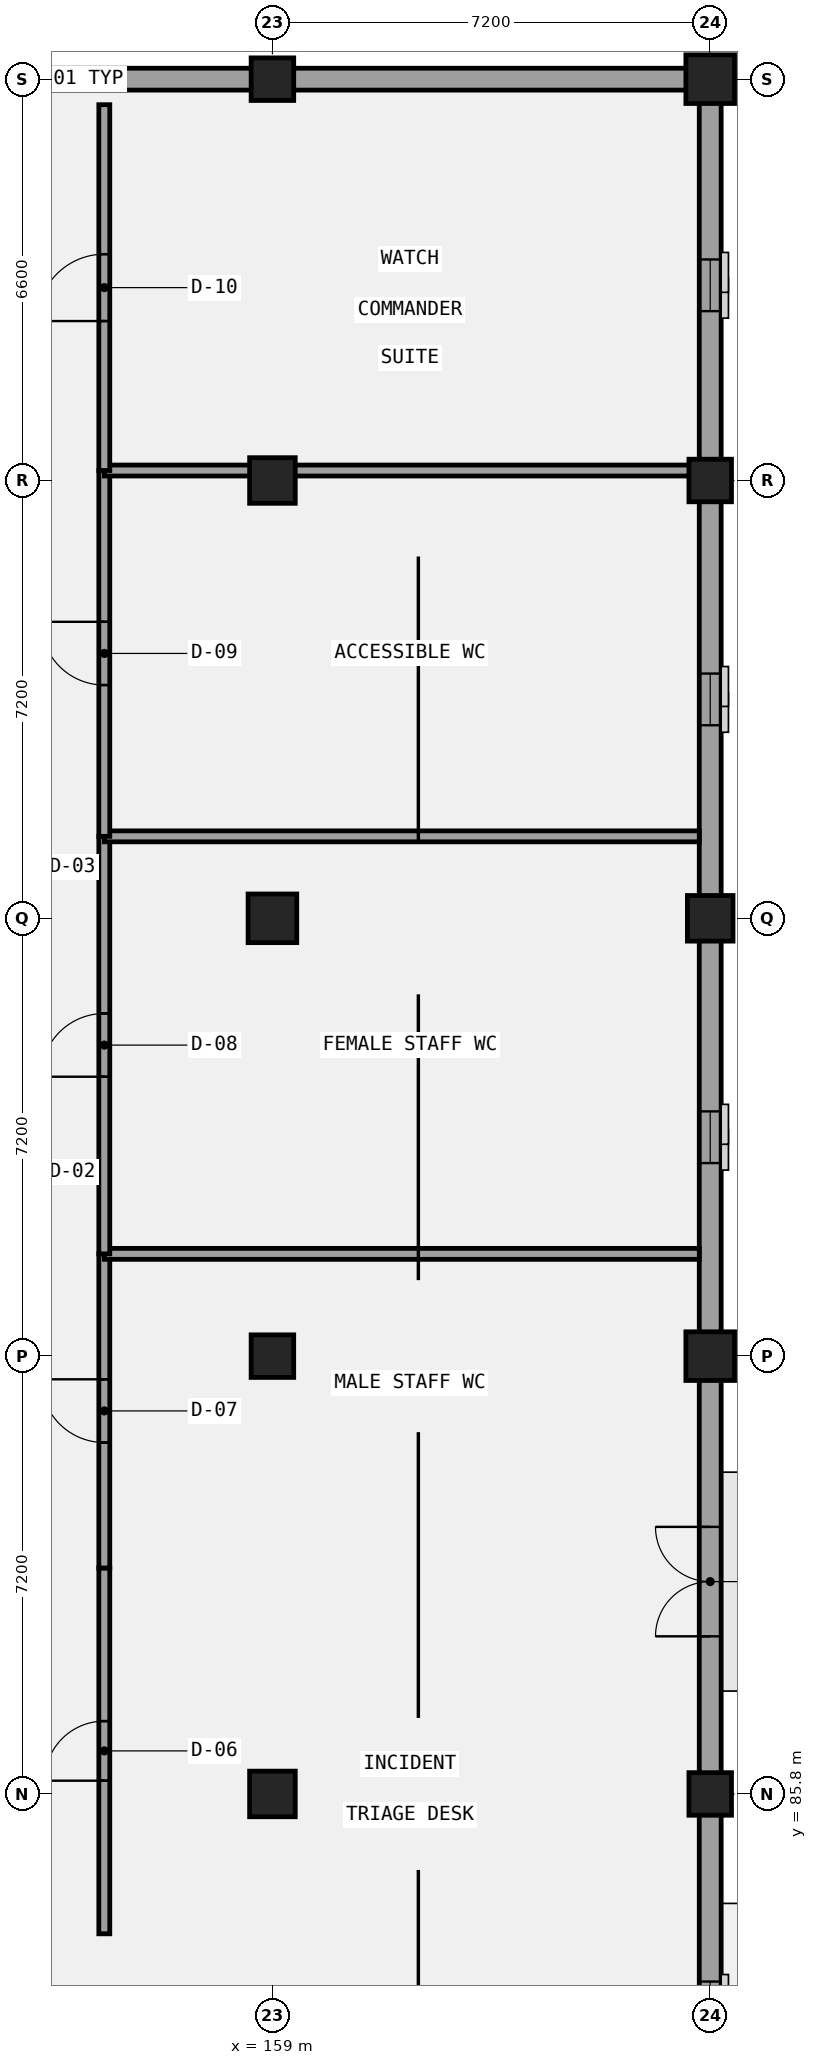
"""IFC4 building model, lengths in metres.
Left out: names, types, materials, properties, quantities, classifications, styles, units other than length and angle.
Written with IfcOpenShell. Run it as: python <this file> out.ifc"""

import sys

from ifc_helpers import new_model, si_unit, direction, frame, frame_2d, origin, origin_2d, place, context, subcontext, project, spatial, rectangle, extrude, element, fill, save


model = new_model("IFC4")
c1 = context("Model", 3, precision=1e-05, world=origin(), true_north=direction((0.0, 1.0)))
c2 = subcontext(c1, "Body", "Model", "MODEL_VIEW")
j1 = project(units=[si_unit("LENGTHUNIT", "METRE"), si_unit("PLANEANGLEUNIT", "RADIAN")], contexts=[c1])
p1 = place(None, origin())
s1 = spatial("IfcSite", under=j1, at=p1, CompositionType="ELEMENT")
p2 = place(p1, origin())
s2 = spatial("IfcBuilding", under=s1, at=p2, CompositionType="ELEMENT")
p3 = place(p2, origin())
s3 = spatial("IfcBuildingStorey", under=s2, at=p3, CompositionType="ELEMENT", Elevation=0.0)
p4 = place(p3, frame((159.0, 85.8, 0.0), z_axis=(0.0, 0.0, 1.0), x_axis=(1.0, 0.0, 0.0)))
e1 = element("IfcColumn", 1, at=p4, inside=s3, PredefinedType="COLUMN", context=c2, shape_type="SweptSolid", body=[
    extrude(rectangle(XDim=0.75, YDim=0.75, at=origin_2d()), origin(), (0.0, 0.0, 1.0), 5.4),
])
p5 = place(p3, frame((159.0, 93.0, 0.0), z_axis=(0.0, 0.0, 1.0), x_axis=(1.0, 0.0, 0.0)))
e2 = element("IfcColumn", 2, at=p5, inside=s3, PredefinedType="COLUMN", context=c2, shape_type="SweptSolid", body=[
    extrude(rectangle(XDim=0.7, YDim=0.7, at=origin_2d()), origin(), (0.0, 0.0, 1.0), 5.4),
])
p6 = place(p3, frame((159.0, 100.2, 0.0), z_axis=(0.0, 0.0, 1.0), x_axis=(1.0, 0.0, 0.0)))
e3 = element("IfcColumn", 3, at=p6, inside=s3, PredefinedType="COLUMN", context=c2, shape_type="SweptSolid", body=[
    extrude(rectangle(XDim=0.8, YDim=0.8, at=origin_2d()), origin(), (0.0, 0.0, 1.0), 5.4),
])
p7 = place(p3, frame((159.0, 107.4, 0.0), z_axis=(0.0, 0.0, 1.0), x_axis=(1.0, 0.0, 0.0)))
e4 = element("IfcColumn", 4, at=p7, inside=s3, PredefinedType="COLUMN", context=c2, shape_type="SweptSolid", body=[
    extrude(rectangle(XDim=0.75, YDim=0.75, at=origin_2d()), origin(), (0.0, 0.0, 1.0), 5.4),
])
for number, where, z_axis, x_axis in (
    (5, (159.0, 114.0, 0.0), (0.0, 0.0, 1.0), (1.0, 0.0, 0.0)),
    (6, (166.2, 85.8, 0.0), (0.0, 0.0, 1.0), (1.0, 0.0, 0.0)),
):
    element("IfcColumn", number, at=place(p3, frame(where, z_axis=z_axis, x_axis=x_axis)), inside=s3, PredefinedType="COLUMN", context=c2, shape_type="SweptSolid", body=[
        extrude(rectangle(XDim=0.7, YDim=0.7, at=origin_2d()), origin(), (0.0, 0.0, 1.0), 5.4),
    ])
p8 = place(p3, frame((166.2, 93.0, 0.0), z_axis=(0.0, 0.0, 1.0), x_axis=(1.0, 0.0, 0.0)))
e7 = element("IfcColumn", 7, at=p8, inside=s3, PredefinedType="COLUMN", context=c2, shape_type="SweptSolid", body=[
    extrude(rectangle(XDim=0.8, YDim=0.8, at=origin_2d()), origin(), (0.0, 0.0, 1.0), 5.4),
])
p9 = place(p3, frame((166.2, 100.2, 0.0), z_axis=(0.0, 0.0, 1.0), x_axis=(1.0, 0.0, 0.0)))
e8 = element("IfcColumn", 8, at=p9, inside=s3, PredefinedType="COLUMN", context=c2, shape_type="SweptSolid", body=[
    extrude(rectangle(XDim=0.75, YDim=0.75, at=origin_2d()), origin(), (0.0, 0.0, 1.0), 5.4),
])
p10 = place(p3, frame((166.2, 107.4, 0.0), z_axis=(0.0, 0.0, 1.0), x_axis=(1.0, 0.0, 0.0)))
e9 = element("IfcColumn", 9, at=p10, inside=s3, PredefinedType="COLUMN", context=c2, shape_type="SweptSolid", body=[
    extrude(rectangle(XDim=0.7, YDim=0.7, at=origin_2d()), origin(), (0.0, 0.0, 1.0), 5.4),
])
p11 = place(p3, frame((166.2, 114.0, 0.0), z_axis=(0.0, 0.0, 1.0), x_axis=(1.0, 0.0, 0.0)))
e10 = element("IfcColumn", 10, at=p11, inside=s3, PredefinedType="COLUMN", context=c2, shape_type="SweptSolid", body=[
    extrude(rectangle(XDim=0.8, YDim=0.8, at=origin_2d()), origin(), (0.0, 0.0, 1.0), 5.4),
])
p12 = place(p3, frame((166.2, 78.78, 0.0), z_axis=(0.0, 0.0, 1.0), x_axis=(0.0, 1.0, 0.0)))
e11 = element("IfcWall", 11, at=p12, inside=s3, PredefinedType="SOLIDWALL", context=c2, shape_type="SweptSolid", body=[
    extrude(rectangle(XDim=35.04, YDim=0.36, at=frame_2d((17.52, 0.0))), origin(), (0.0, 0.0, 1.0), 4.22),
])
p13 = place(p12, frame((9.612, 0.0, 0.0)))
e12 = element("IfcOpeningElement", 12, at=p13, cuts=e11, PredefinedType="OPENING", context=c2, shape_type="SweptSolid", body=[
    extrude(rectangle(XDim=1.8, YDim=2.4, at=frame_2d((0.9, 1.2))), frame((0.0, 0.19, 0.0), z_axis=(0.0, -1.0, 0.0), x_axis=(1.0, 0.0, 0.0)), (0.0, 0.0, 1.0), 0.38),
])
p14 = place(p12, frame((3.085, 0.0, 0.95)))
e13 = element("IfcOpeningElement", 13, at=p14, cuts=e11, PredefinedType="OPENING", context=c2, shape_type="SweptSolid", body=[
    extrude(rectangle(XDim=0.85, YDim=1.4, at=frame_2d((0.425, 0.7))), frame((0.0, 0.19, 0.0), z_axis=(0.0, -1.0, 0.0), x_axis=(1.0, 0.0, 0.0)), (0.0, 0.0, 1.0), 0.38),
])
p15 = place(p12, frame((17.395, 0.0, 0.95)))
e14 = element("IfcOpeningElement", 14, at=p15, cuts=e11, PredefinedType="OPENING", context=c2, shape_type="SweptSolid", body=[
    extrude(rectangle(XDim=0.85, YDim=1.9, at=frame_2d((0.425, 0.95))), frame((0.0, 0.19, 0.0), z_axis=(0.0, -1.0, 0.0), x_axis=(1.0, 0.0, 0.0)), (0.0, 0.0, 1.0), 0.38),
])
p16 = place(p12, frame((24.595, 0.0, 0.95)))
e15 = element("IfcOpeningElement", 15, at=p16, cuts=e11, PredefinedType="OPENING", context=c2, shape_type="SweptSolid", body=[
    extrude(rectangle(XDim=0.85, YDim=2.15, at=frame_2d((0.425, 1.075))), frame((0.0, 0.19, 0.0), z_axis=(0.0, -1.0, 0.0), x_axis=(1.0, 0.0, 0.0)), (0.0, 0.0, 1.0), 0.38),
])
p17 = place(p12, frame((31.405, 0.0, 0.95)))
e16 = element("IfcOpeningElement", 16, at=p17, cuts=e11, PredefinedType="OPENING", context=c2, shape_type="SweptSolid", body=[
    extrude(rectangle(XDim=0.85, YDim=2.4, at=frame_2d((0.425, 1.2))), frame((0.0, 0.19, 0.0), z_axis=(0.0, -1.0, 0.0), x_axis=(1.0, 0.0, 0.0)), (0.0, 0.0, 1.0), 0.38),
])
p18 = place(p3, frame((166.38, 114.0, 0.0), z_axis=(0.0, 0.0, 1.0), x_axis=(-1.0, 0.0, 0.0)))
e17 = element("IfcWall", 17, at=p18, inside=s3, PredefinedType="SOLIDWALL", context=c2, shape_type="SweptSolid", body=[
    extrude(rectangle(XDim=21.96, YDim=0.36, at=frame_2d((10.98, 0.0))), origin(), (0.0, 0.0, 1.0), 4.37),
])
p19 = place(p18, frame((17.755, 0.0, 0.95)))
e18 = element("IfcOpeningElement", 18, at=p19, cuts=e17, PredefinedType="OPENING", context=c2, shape_type="SweptSolid", body=[
    extrude(rectangle(XDim=0.85, YDim=1.4, at=frame_2d((0.425, 0.7))), frame((0.0, 0.19, 0.0), z_axis=(0.0, -1.0, 0.0), x_axis=(1.0, 0.0, 0.0)), (0.0, 0.0, 1.0), 0.38),
])
p20 = place(p3, frame((156.235, 83.5, 0.0), z_axis=(0.0, 0.0, 1.0), x_axis=(0.0, 1.0, 0.0)))
e19 = element("IfcWall", 19, at=p20, inside=s3, PredefinedType="PARTITIONING", context=c2, shape_type="SweptSolid", body=[
    extrude(rectangle(XDim=6.016, YDim=0.18, at=frame_2d((3.008, 0.0))), origin(), (0.0, 0.0, 1.0), 5.12),
])
p21 = place(p20, frame((2.518, 0.0, 0.0)))
e20 = element("IfcOpeningElement", 20, at=p21, cuts=e19, PredefinedType="OPENING", context=c2, shape_type="SweptSolid", body=[
    extrude(rectangle(XDim=0.98, YDim=2.35, at=frame_2d((0.49, 1.175))), frame((0.0, 0.1, 0.0), z_axis=(0.0, -1.0, 0.0), x_axis=(1.0, 0.0, 0.0)), (0.0, 0.0, 1.0), 0.2),
])
p22 = place(p3, frame((156.235, 89.516, 0.0), z_axis=(0.0, 0.0, 1.0), x_axis=(0.0, 1.0, 0.0)))
e21 = element("IfcWall", 21, at=p22, inside=s3, PredefinedType="PARTITIONING", context=c2, shape_type="SweptSolid", body=[
    extrude(rectangle(XDim=5.166, YDim=0.18, at=frame_2d((2.583, 0.0))), origin(), (0.0, 0.0, 1.0), 5.12),
])
p23 = place(p22, frame((2.063, 0.0, 0.0)))
e22 = element("IfcOpeningElement", 22, at=p23, cuts=e21, PredefinedType="OPENING", context=c2, shape_type="SweptSolid", body=[
    extrude(rectangle(XDim=1.04, YDim=2.1, at=frame_2d((0.52, 1.05))), frame((0.0, 0.1, 0.0), z_axis=(0.0, -1.0, 0.0), x_axis=(1.0, 0.0, 0.0)), (0.0, 0.0, 1.0), 0.2),
])
p24 = place(p3, frame((156.235, 94.682, 0.0), z_axis=(0.0, 0.0, 1.0), x_axis=(1.0, 0.0, 0.0)))
e23 = element("IfcWall", 23, at=p24, inside=s3, PredefinedType="PARTITIONING", context=c2, shape_type="SweptSolid", body=[
    extrude(rectangle(XDim=9.785, YDim=0.18, at=frame_2d((4.893, 0.0))), origin(), (0.0, 0.0, 1.0), 4.57),
])
p25 = place(p3, frame((156.235, 94.682, 0.0), z_axis=(0.0, 0.0, 1.0), x_axis=(0.0, 1.0, 0.0)))
e24 = element("IfcWall", 24, at=p25, inside=s3, PredefinedType="PARTITIONING", context=c2, shape_type="SweptSolid", body=[
    extrude(rectangle(XDim=6.866, YDim=0.18, at=frame_2d((3.433, 0.0))), origin(), (0.0, 0.0, 1.0), 5.12),
])
p26 = place(p25, frame((2.913, 0.0, 0.0)))
e25 = element("IfcOpeningElement", 25, at=p26, cuts=e24, PredefinedType="OPENING", context=c2, shape_type="SweptSolid", body=[
    extrude(rectangle(XDim=1.04, YDim=2.22, at=frame_2d((0.52, 1.11))), frame((0.0, 0.1, 0.0), z_axis=(0.0, -1.0, 0.0), x_axis=(1.0, 0.0, 0.0)), (0.0, 0.0, 1.0), 0.2),
])
p27 = place(p3, frame((156.235, 101.548, 0.0), z_axis=(0.0, 0.0, 1.0), x_axis=(1.0, 0.0, 0.0)))
e26 = element("IfcWall", 26, at=p27, inside=s3, PredefinedType="PARTITIONING", context=c2, shape_type="SweptSolid", body=[
    extrude(rectangle(XDim=9.785, YDim=0.18, at=frame_2d((4.893, 0.0))), origin(), (0.0, 0.0, 1.0), 5.12),
])
p28 = place(p3, frame((156.235, 101.548, 0.0), z_axis=(0.0, 0.0, 1.0), x_axis=(0.0, 1.0, 0.0)))
e27 = element("IfcWall", 27, at=p28, inside=s3, PredefinedType="PARTITIONING", context=c2, shape_type="SweptSolid", body=[
    extrude(rectangle(XDim=6.016, YDim=0.18, at=frame_2d((3.008, 0.0))), origin(), (0.0, 0.0, 1.0), 5.12),
])
p29 = place(p28, frame((2.488, 0.0, 0.0)))
e28 = element("IfcOpeningElement", 28, at=p29, cuts=e27, PredefinedType="OPENING", context=c2, shape_type="SweptSolid", body=[
    extrude(rectangle(XDim=1.04, YDim=2.35, at=frame_2d((0.52, 1.175))), frame((0.0, 0.1, 0.0), z_axis=(0.0, -1.0, 0.0), x_axis=(1.0, 0.0, 0.0)), (0.0, 0.0, 1.0), 0.2),
])
p30 = place(p3, frame((156.235, 107.564, 0.0), z_axis=(0.0, 0.0, 1.0), x_axis=(1.0, 0.0, 0.0)))
e29 = element("IfcWall", 29, at=p30, inside=s3, PredefinedType="PARTITIONING", context=c2, shape_type="SweptSolid", body=[
    extrude(rectangle(XDim=9.785, YDim=0.18, at=frame_2d((4.893, 0.0))), origin(), (0.0, 0.0, 1.0), 4.37),
])
p31 = place(p3, frame((156.235, 107.564, 0.0), z_axis=(0.0, 0.0, 1.0), x_axis=(0.0, 1.0, 0.0)))
e30 = element("IfcWall", 30, at=p31, inside=s3, PredefinedType="PARTITIONING", context=c2, shape_type="SweptSolid", body=[
    extrude(rectangle(XDim=6.016, YDim=0.18, at=frame_2d((3.008, 0.0))), origin(), (0.0, 0.0, 1.0), 5.12),
])
p32 = place(p31, frame((2.458, 0.0, 0.0)))
e31 = element("IfcOpeningElement", 31, at=p32, cuts=e30, PredefinedType="OPENING", context=c2, shape_type="SweptSolid", body=[
    extrude(rectangle(XDim=1.1, YDim=2.1, at=frame_2d((0.55, 1.05))), frame((0.0, 0.1, 0.0), z_axis=(0.0, -1.0, 0.0), x_axis=(1.0, 0.0, 0.0)), (0.0, 0.0, 1.0), 0.2),
])
p33 = place(p13, frame((1.8, 0.0, 0.0), z_axis=(0.0, 0.0, 1.0), x_axis=(-1.0, 0.0, 0.0)))
e32 = element("IfcDoor", 32, at=p33, inside=s3, OperationType="DOUBLE_DOOR_SINGLE_SWING", PredefinedType="DOOR", context=c2, shape_type="SweptSolid", body=[
    extrude(rectangle(XDim=1.8, YDim=2.4, at=frame_2d((0.9, 1.2))), frame((0.0, 0.025, 0.0), z_axis=(0.0, -1.0, 0.0), x_axis=(1.0, 0.0, 0.0)), (0.0, 0.0, 1.0), 0.05),
])
fill(e12, e32)
p34 = place(p14, origin())
e33 = element("IfcWindow", 33, at=p34, inside=s3, PartitioningType="SINGLE_PANEL", PredefinedType="WINDOW", context=c2, shape_type="SweptSolid", body=[
    extrude(rectangle(XDim=0.85, YDim=1.4, at=frame_2d((0.425, 0.7))), frame((0.0, 0.03, 0.0), z_axis=(0.0, -1.0, 0.0), x_axis=(1.0, 0.0, 0.0)), (0.0, 0.0, 1.0), 0.06),
])
fill(e13, e33)
p35 = place(p15, origin())
e34 = element("IfcWindow", 34, at=p35, inside=s3, PartitioningType="SINGLE_PANEL", PredefinedType="WINDOW", context=c2, shape_type="SweptSolid", body=[
    extrude(rectangle(XDim=0.85, YDim=1.9, at=frame_2d((0.425, 0.95))), frame((0.0, 0.03, 0.0), z_axis=(0.0, -1.0, 0.0), x_axis=(1.0, 0.0, 0.0)), (0.0, 0.0, 1.0), 0.06),
])
fill(e14, e34)
p36 = place(p16, origin())
e35 = element("IfcWindow", 35, at=p36, inside=s3, PartitioningType="SINGLE_PANEL", PredefinedType="WINDOW", context=c2, shape_type="SweptSolid", body=[
    extrude(rectangle(XDim=0.85, YDim=2.15, at=frame_2d((0.425, 1.075))), frame((0.0, 0.03, 0.0), z_axis=(0.0, -1.0, 0.0), x_axis=(1.0, 0.0, 0.0)), (0.0, 0.0, 1.0), 0.06),
])
fill(e15, e35)
p37 = place(p17, origin())
e36 = element("IfcWindow", 36, at=p37, inside=s3, PartitioningType="SINGLE_PANEL", PredefinedType="WINDOW", context=c2, shape_type="SweptSolid", body=[
    extrude(rectangle(XDim=0.85, YDim=2.4, at=frame_2d((0.425, 1.2))), frame((0.0, 0.03, 0.0), z_axis=(0.0, -1.0, 0.0), x_axis=(1.0, 0.0, 0.0)), (0.0, 0.0, 1.0), 0.06),
])
fill(e16, e36)
p38 = place(p21, origin())
e37 = element("IfcDoor", 37, at=p38, inside=s3, OperationType="SINGLE_SWING_LEFT", PredefinedType="DOOR", context=c2, shape_type="SweptSolid", body=[
    extrude(rectangle(XDim=0.98, YDim=2.35, at=frame_2d((0.49, 1.175))), frame((0.0, 0.025, 0.0), z_axis=(0.0, -1.0, 0.0), x_axis=(1.0, 0.0, 0.0)), (0.0, 0.0, 1.0), 0.05),
])
fill(e20, e37)
p39 = place(p23, origin())
e38 = element("IfcDoor", 38, at=p39, inside=s3, OperationType="SINGLE_SWING_RIGHT", PredefinedType="DOOR", context=c2, shape_type="SweptSolid", body=[
    extrude(rectangle(XDim=1.04, YDim=2.1, at=frame_2d((0.52, 1.05))), frame((0.0, 0.025, 0.0), z_axis=(0.0, -1.0, 0.0), x_axis=(1.0, 0.0, 0.0)), (0.0, 0.0, 1.0), 0.05),
])
fill(e22, e38)
p40 = place(p26, origin())
e39 = element("IfcDoor", 39, at=p40, inside=s3, OperationType="SINGLE_SWING_LEFT", PredefinedType="DOOR", context=c2, shape_type="SweptSolid", body=[
    extrude(rectangle(XDim=1.04, YDim=2.22, at=frame_2d((0.52, 1.11))), frame((0.0, 0.025, 0.0), z_axis=(0.0, -1.0, 0.0), x_axis=(1.0, 0.0, 0.0)), (0.0, 0.0, 1.0), 0.05),
])
fill(e25, e39)
p41 = place(p29, origin())
e40 = element("IfcDoor", 40, at=p41, inside=s3, OperationType="SINGLE_SWING_RIGHT", PredefinedType="DOOR", context=c2, shape_type="SweptSolid", body=[
    extrude(rectangle(XDim=1.04, YDim=2.35, at=frame_2d((0.52, 1.175))), frame((0.0, 0.025, 0.0), z_axis=(0.0, -1.0, 0.0), x_axis=(1.0, 0.0, 0.0)), (0.0, 0.0, 1.0), 0.05),
])
fill(e28, e40)
p42 = place(p32, origin())
e41 = element("IfcDoor", 41, at=p42, inside=s3, OperationType="SINGLE_SWING_LEFT", PredefinedType="DOOR", context=c2, shape_type="SweptSolid", body=[
    extrude(rectangle(XDim=1.1, YDim=2.1, at=frame_2d((0.55, 1.05))), frame((0.0, 0.025, 0.0), z_axis=(0.0, -1.0, 0.0), x_axis=(1.0, 0.0, 0.0)), (0.0, 0.0, 1.0), 0.05),
])
fill(e31, e41)
save(model, sys.argv[1])
